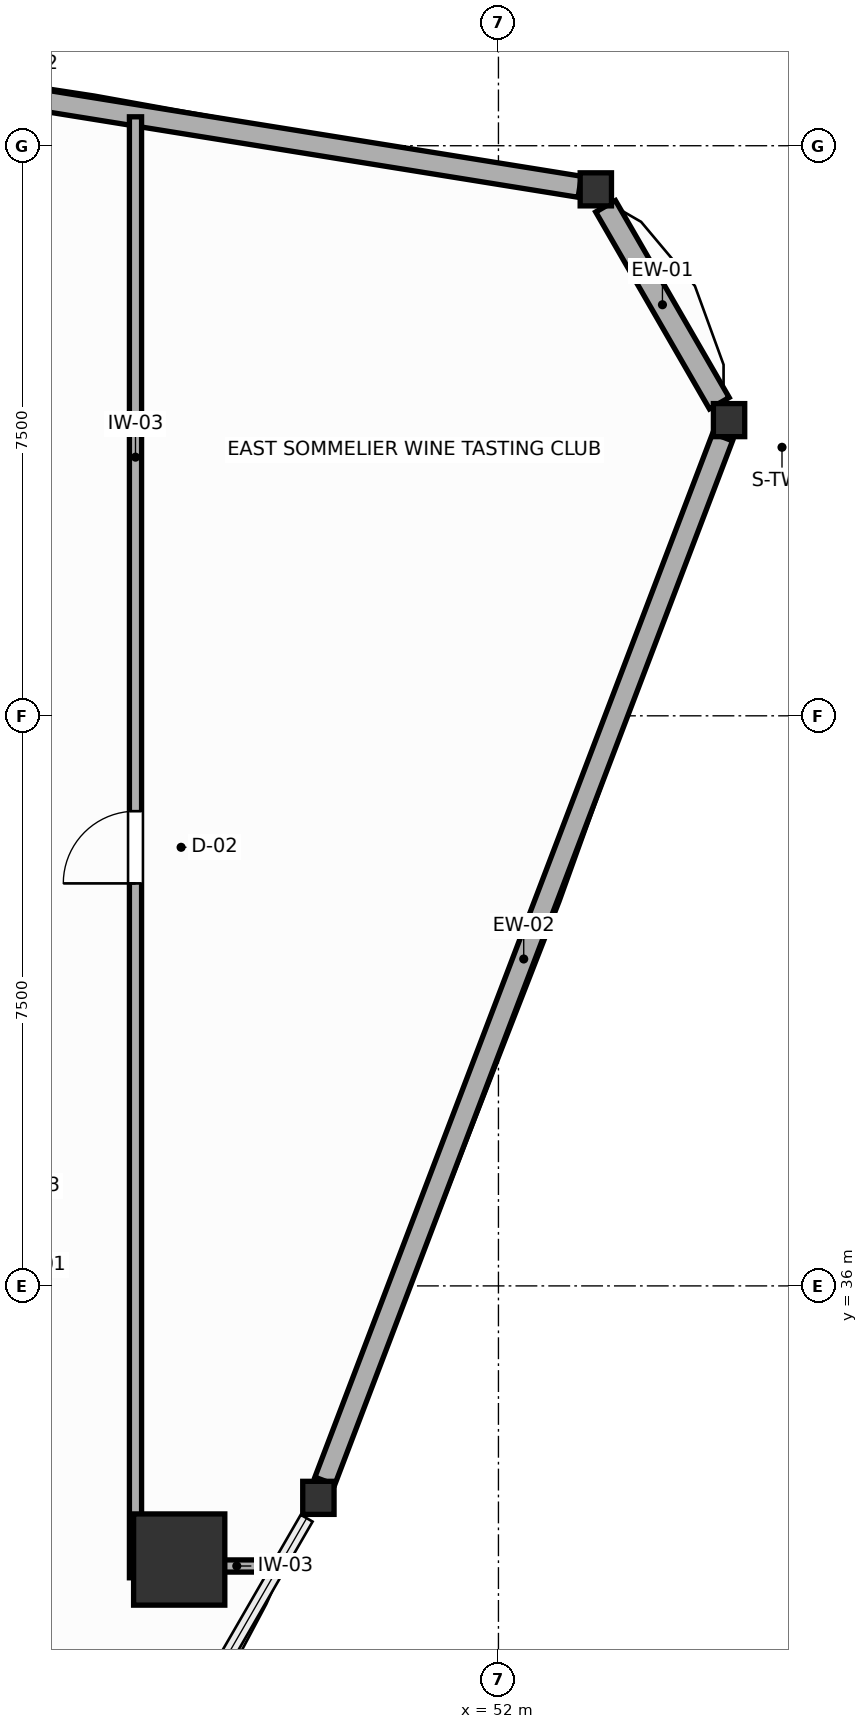
"""IFC4 building model, lengths in metres.
Left out: names, types, materials, properties, quantities, classifications, styles, units other than length and angle.
Written with IfcOpenShell. Run it as: python <this file> out.ifc"""

import sys

from ifc_helpers import new_model, si_unit, direction, frame, frame_2d, origin, origin_2d, place, context, subcontext, project, spatial, rectangle, i_section, extrude, source, transform, mapped, element, fill, save


model = new_model("IFC4")
c1 = context("Model", 3, precision=1e-05, world=origin(), true_north=direction((0.0, 1.0)))
c2 = subcontext(c1, "Body", "Model", "MODEL_VIEW")
j1 = project(units=[si_unit("LENGTHUNIT", "METRE"), si_unit("PLANEANGLEUNIT", "RADIAN")], contexts=[c1])
p1 = place(None, origin())
s1 = spatial("IfcSite", under=j1, at=p1, CompositionType="ELEMENT")
p2 = place(p1, origin())
s2 = spatial("IfcBuilding", under=s1, at=p2, CompositionType="ELEMENT")
p3 = place(p2, frame((0.0, 0.0, 154.2)))
s3 = spatial("IfcBuildingStorey", under=s2, at=p3, CompositionType="ELEMENT", Elevation=154.2)
m1 = source(origin(), c2, "Body", "SweptSolid", [
    extrude(rectangle(XDim=1.2, YDim=1.2, at=origin_2d()), origin(), (0.0, 0.0, 1.0), 3.6),
])
p4 = place(p3, frame((47.8, 32.4, 0.0), z_axis=(0.0, 0.0, 1.0), x_axis=(1.0, 0.0, 0.0)))
e1 = element("IfcColumn", 1, at=p4, inside=s3, PredefinedType="COLUMN", context=c2, shape_type="MappedRepresentation", body=[
    mapped(m1, transform((0.0, 0.0, 0.0), scale=1.0)),
])
m2 = source(origin(), c2, "Body", "SweptSolid", [
    extrude(i_section(OverallWidth=0.412, OverallDepth=0.435, WebThickness=0.033, FlangeThickness=0.053, FilletRadius=0.015, at=origin_2d()), origin(), (0.0, 0.0, 1.0), 3.6),
])
for number, where, z_axis, x_axis in (
    (2, (55.034, 47.39, 0.0), (0.0, 0.0, 1.0), (1.0, 0.0, 0.0)),
    (3, (53.281, 50.426, 0.0), (0.0, 0.0, 1.0), (1.0, 0.0, 0.0)),
    (4, (49.631, 33.212, 0.0), (0.0, 0.0, 1.0), (1.0, 0.0, 0.0)),
):
    element("IfcColumn", number, at=place(p3, frame(where, z_axis=z_axis, x_axis=x_axis)), inside=s3, PredefinedType="COLUMN", context=c2, shape_type="MappedRepresentation", body=[
        mapped(m2, transform((0.0, 0.0, 0.0), scale=1.0)),
    ])
p5 = place(p3, frame((54.906, 47.613, 0.0), z_axis=(0.0, 0.0, 1.0), x_axis=(-0.499974392705, 0.866040187658, 0.0)))
e5 = element("IfcWall", 5, at=p5, inside=s3, PredefinedType="SOLIDWALL", context=c2, shape_type="SweptSolid", body=[
    extrude(rectangle(XDim=2.992, YDim=0.3, at=frame_2d((1.496, 0.0))), origin(), (0.0, 0.0, 1.0), 1.87),
])
p6 = place(p3, frame((53.07, 50.46, 0.0), z_axis=(0.0, 0.0, 1.0), x_axis=(-0.987303259595, 0.158846698404, 0.0)))
e6 = element("IfcWall", 6, at=p6, inside=s3, PredefinedType="SOLIDWALL", context=c2, shape_type="SweptSolid", body=[
    extrude(rectangle(XDim=14.746, YDim=0.28, at=frame_2d((7.373, 0.0))), origin(), (0.0, 0.0, 1.0), 1.87),
])
p7 = place(p3, frame((49.716, 33.434, 0.0), z_axis=(0.0, 0.0, 1.0), x_axis=(0.356077530784, 0.934456415287, 0.0)))
e7 = element("IfcWall", 7, at=p7, inside=s3, PredefinedType="SOLIDWALL", context=c2, shape_type="SweptSolid", body=[
    extrude(rectangle(XDim=14.697, YDim=0.28, at=frame_2d((7.348, 0.0))), origin(), (0.0, 0.0, 1.0), 1.87),
])
p8 = place(p3, frame((47.225, 32.16, 0.0), z_axis=(0.0, 0.0, 1.0), x_axis=(0.0, 1.0, 0.0)))
e8 = element("IfcWall", 8, at=p8, inside=s3, PredefinedType="PARTITIONING", context=c2, shape_type="SweptSolid", body=[
    extrude(rectangle(XDim=19.221, YDim=0.16, at=frame_2d((9.61, 0.0))), origin(), (0.0, 0.0, 1.0), 3.4),
])
p9 = place(p8, frame((9.135, 0.0, 0.0)))
e9 = element("IfcOpeningElement", 9, at=p9, cuts=e8, PredefinedType="OPENING", context=c2, shape_type="SweptSolid", body=[
    extrude(rectangle(XDim=0.95, YDim=2.05, at=frame_2d((0.475, 1.025))), frame((0.0, 0.09, 0.0), z_axis=(0.0, -1.0, 0.0), x_axis=(1.0, 0.0, 0.0)), (0.0, 0.0, 1.0), 0.18),
])
p10 = place(p3, frame((47.307, 32.315, 0.0), z_axis=(0.0, 0.0, 1.0), x_axis=(1.0, 0.0, 0.0)))
e10 = element("IfcWall", 10, at=p10, inside=s3, PredefinedType="PARTITIONING", context=c2, shape_type="SweptSolid", body=[
    extrude(rectangle(XDim=1.787, YDim=0.16, at=frame_2d((0.893, 0.0))), origin(), (0.0, 0.0, 1.0), 2.16),
])
p11 = place(p9, origin())
e11 = element("IfcDoor", 11, at=p11, inside=s3, OperationType="SINGLE_SWING_LEFT", PredefinedType="DOOR", context=c2, shape_type="SweptSolid", body=[
    extrude(rectangle(XDim=0.95, YDim=2.05, at=frame_2d((0.475, 1.025))), frame((0.0, 0.025, 0.0), z_axis=(0.0, -1.0, 0.0), x_axis=(1.0, 0.0, 0.0)), (0.0, 0.0, 1.0), 0.05),
])
fill(e9, e11)
save(model, sys.argv[1])
